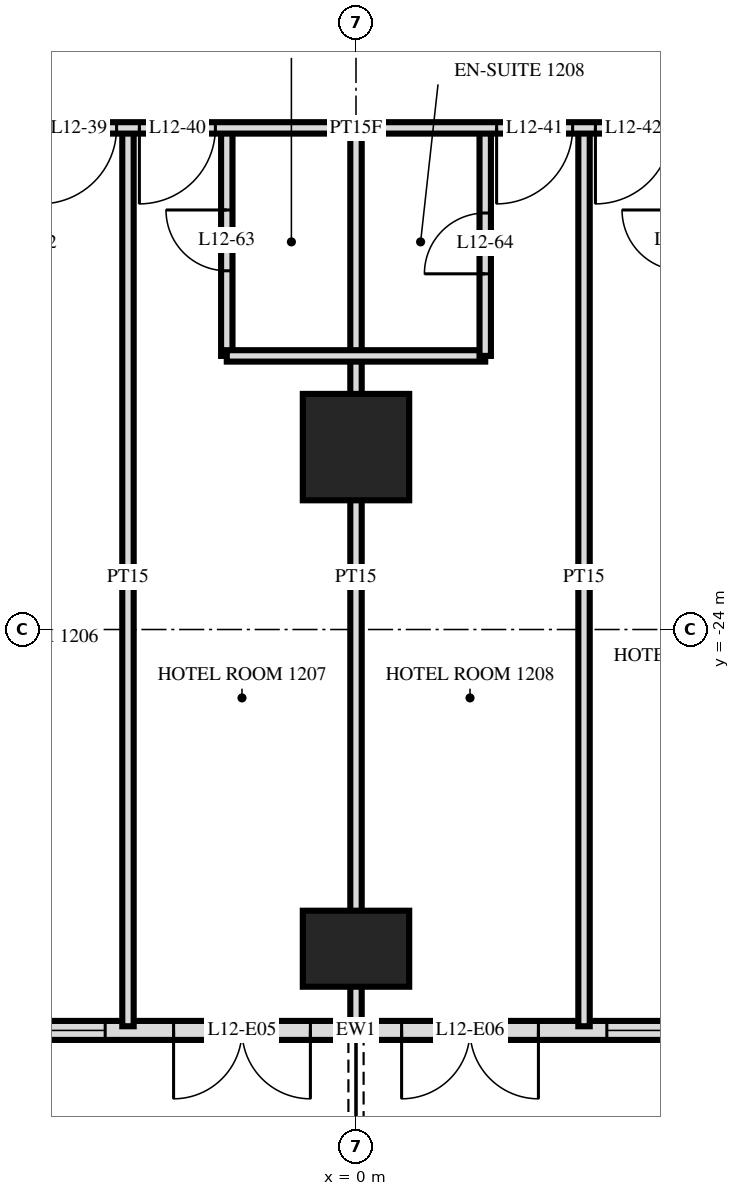
"""IFC4 building model, lengths in metres.
Left out: names, types, materials, properties, quantities, classifications, styles, units other than length and angle.
Written with IfcOpenShell. Run it as: python <this file> out.ifc"""

import sys

from ifc_helpers import new_model, si_unit, direction, frame, frame_2d, origin, origin_2d, place, context, subcontext, project, spatial, rectangle, extrude, element, fill, save


model = new_model("IFC4")
c1 = context("Model", 3, precision=1e-05, world=origin(), true_north=direction((0.0, 1.0)))
c2 = subcontext(c1, "Body", "Model", "MODEL_VIEW")
j1 = project(units=[si_unit("LENGTHUNIT", "METRE"), si_unit("PLANEANGLEUNIT", "RADIAN")], contexts=[c1])
p1 = place(None, origin())
s1 = spatial("IfcSite", under=j1, at=p1, CompositionType="ELEMENT")
p2 = place(p1, origin())
s2 = spatial("IfcBuilding", under=s1, at=p2, CompositionType="ELEMENT")
p3 = place(p2, frame((0.0, 0.0, 52.8)))
s3 = spatial("IfcBuildingStorey", under=s2, at=p3, CompositionType="ELEMENT", Elevation=52.8)
p4 = place(p3, frame((0.0, -28.2, 0.0), z_axis=(0.0, 0.0, 1.0), x_axis=(1.0, 0.0, 0.0)))
e1 = element("IfcColumn", 1, at=p4, inside=s3, PredefinedType="COLUMN", context=c2, shape_type="SweptSolid", body=[
    extrude(rectangle(XDim=1.4, YDim=1.0, at=origin_2d()), origin(), (0.0, 0.0, 1.0), 3.6),
])
p5 = place(p3, frame((0.0, -21.6, 0.0), z_axis=(0.0, 0.0, 1.0), x_axis=(1.0, 0.0, 0.0)))
e2 = element("IfcColumn", 2, at=p5, inside=s3, PredefinedType="COLUMN", context=c2, shape_type="SweptSolid", body=[
    extrude(rectangle(XDim=1.4, YDim=1.4, at=origin_2d()), origin(), (0.0, 0.0, 1.0), 3.6),
])
p6 = place(p3, frame((-28.775, -29.275, 0.0), z_axis=(0.0, 0.0, 1.0), x_axis=(1.0, 0.0, 0.0)))
e3 = element("IfcWall", 3, at=p6, inside=s3, PredefinedType="SOLIDWALL", context=c2, shape_type="SweptSolid", body=[
    extrude(rectangle(XDim=57.551, YDim=0.25, at=frame_2d((28.775, 0.0))), origin(), (0.0, 0.0, 1.0), 3.32),
])
p7 = place(p6, frame((0.575, 0.0, 0.0)))
e4 = element("IfcOpeningElement", 4, at=p7, cuts=e3, PredefinedType="OPENING", context=c2, shape_type="SweptSolid", body=[
    extrude(rectangle(XDim=1.8, YDim=2.4, at=frame_2d((0.9, 1.2))), frame((0.0, 0.135, 0.0), z_axis=(0.0, -1.0, 0.0), x_axis=(1.0, 0.0, 0.0)), (0.0, 0.0, 1.0), 0.27),
])
p8 = place(p6, frame((5.375, 0.0, 0.0)))
e5 = element("IfcOpeningElement", 5, at=p8, cuts=e3, PredefinedType="OPENING", context=c2, shape_type="SweptSolid", body=[
    extrude(rectangle(XDim=1.8, YDim=2.4, at=frame_2d((0.9, 1.2))), frame((0.0, 0.135, 0.0), z_axis=(0.0, -1.0, 0.0), x_axis=(1.0, 0.0, 0.0)), (0.0, 0.0, 1.0), 0.27),
])
p9 = place(p6, frame((8.075, 0.0, 0.3)))
e6 = element("IfcOpeningElement", 6, at=p9, cuts=e3, PredefinedType="OPENING", context=c2, shape_type="SweptSolid", body=[
    extrude(rectangle(XDim=2.4, YDim=2.1, at=frame_2d((1.2, 1.05))), frame((0.0, 0.135, 0.0), z_axis=(0.0, -1.0, 0.0), x_axis=(1.0, 0.0, 0.0)), (0.0, 0.0, 1.0), 0.27),
])
p10 = place(p6, frame((11.375, 0.0, 0.0)))
e7 = element("IfcOpeningElement", 7, at=p10, cuts=e3, PredefinedType="OPENING", context=c2, shape_type="SweptSolid", body=[
    extrude(rectangle(XDim=1.8, YDim=2.4, at=frame_2d((0.9, 1.2))), frame((0.0, 0.135, 0.0), z_axis=(0.0, -1.0, 0.0), x_axis=(1.0, 0.0, 0.0)), (0.0, 0.0, 1.0), 0.27),
])
p11 = place(p6, frame((14.075, 0.0, 0.3)))
e8 = element("IfcOpeningElement", 8, at=p11, cuts=e3, PredefinedType="OPENING", context=c2, shape_type="SweptSolid", body=[
    extrude(rectangle(XDim=2.4, YDim=2.1, at=frame_2d((1.2, 1.05))), frame((0.0, 0.135, 0.0), z_axis=(0.0, -1.0, 0.0), x_axis=(1.0, 0.0, 0.0)), (0.0, 0.0, 1.0), 0.27),
])
p12 = place(p6, frame((17.375, 0.0, 0.0)))
e9 = element("IfcOpeningElement", 9, at=p12, cuts=e3, PredefinedType="OPENING", context=c2, shape_type="SweptSolid", body=[
    extrude(rectangle(XDim=1.8, YDim=2.4, at=frame_2d((0.9, 1.2))), frame((0.0, 0.135, 0.0), z_axis=(0.0, -1.0, 0.0), x_axis=(1.0, 0.0, 0.0)), (0.0, 0.0, 1.0), 0.27),
])
p13 = place(p6, frame((20.075, 0.0, 0.3)))
e10 = element("IfcOpeningElement", 10, at=p13, cuts=e3, PredefinedType="OPENING", context=c2, shape_type="SweptSolid", body=[
    extrude(rectangle(XDim=2.4, YDim=2.1, at=frame_2d((1.2, 1.05))), frame((0.0, 0.135, 0.0), z_axis=(0.0, -1.0, 0.0), x_axis=(1.0, 0.0, 0.0)), (0.0, 0.0, 1.0), 0.27),
])
p14 = place(p6, frame((23.075, 0.0, 0.3)))
e11 = element("IfcOpeningElement", 11, at=p14, cuts=e3, PredefinedType="OPENING", context=c2, shape_type="SweptSolid", body=[
    extrude(rectangle(XDim=2.4, YDim=2.1, at=frame_2d((1.2, 1.05))), frame((0.0, 0.135, 0.0), z_axis=(0.0, -1.0, 0.0), x_axis=(1.0, 0.0, 0.0)), (0.0, 0.0, 1.0), 0.27),
])
p15 = place(p6, frame((26.375, 0.0, 0.0)))
e12 = element("IfcOpeningElement", 12, at=p15, cuts=e3, PredefinedType="OPENING", context=c2, shape_type="SweptSolid", body=[
    extrude(rectangle(XDim=1.8, YDim=2.4, at=frame_2d((0.9, 1.2))), frame((0.0, 0.135, 0.0), z_axis=(0.0, -1.0, 0.0), x_axis=(1.0, 0.0, 0.0)), (0.0, 0.0, 1.0), 0.27),
])
p16 = place(p6, frame((29.375, 0.0, 0.0)))
e13 = element("IfcOpeningElement", 13, at=p16, cuts=e3, PredefinedType="OPENING", context=c2, shape_type="SweptSolid", body=[
    extrude(rectangle(XDim=1.8, YDim=2.4, at=frame_2d((0.9, 1.2))), frame((0.0, 0.135, 0.0), z_axis=(0.0, -1.0, 0.0), x_axis=(1.0, 0.0, 0.0)), (0.0, 0.0, 1.0), 0.27),
])
p17 = place(p6, frame((32.075, 0.0, 0.3)))
e14 = element("IfcOpeningElement", 14, at=p17, cuts=e3, PredefinedType="OPENING", context=c2, shape_type="SweptSolid", body=[
    extrude(rectangle(XDim=2.4, YDim=2.1, at=frame_2d((1.2, 1.05))), frame((0.0, 0.135, 0.0), z_axis=(0.0, -1.0, 0.0), x_axis=(1.0, 0.0, 0.0)), (0.0, 0.0, 1.0), 0.27),
])
p18 = place(p6, frame((35.075, 0.0, 0.3)))
e15 = element("IfcOpeningElement", 15, at=p18, cuts=e3, PredefinedType="OPENING", context=c2, shape_type="SweptSolid", body=[
    extrude(rectangle(XDim=2.4, YDim=2.1, at=frame_2d((1.2, 1.05))), frame((0.0, 0.135, 0.0), z_axis=(0.0, -1.0, 0.0), x_axis=(1.0, 0.0, 0.0)), (0.0, 0.0, 1.0), 0.27),
])
p19 = place(p6, frame((38.375, 0.0, 0.0)))
e16 = element("IfcOpeningElement", 16, at=p19, cuts=e3, PredefinedType="OPENING", context=c2, shape_type="SweptSolid", body=[
    extrude(rectangle(XDim=1.8, YDim=2.4, at=frame_2d((0.9, 1.2))), frame((0.0, 0.135, 0.0), z_axis=(0.0, -1.0, 0.0), x_axis=(1.0, 0.0, 0.0)), (0.0, 0.0, 1.0), 0.27),
])
p20 = place(p6, frame((41.375, 0.0, 0.0)))
e17 = element("IfcOpeningElement", 17, at=p20, cuts=e3, PredefinedType="OPENING", context=c2, shape_type="SweptSolid", body=[
    extrude(rectangle(XDim=1.8, YDim=2.4, at=frame_2d((0.9, 1.2))), frame((0.0, 0.135, 0.0), z_axis=(0.0, -1.0, 0.0), x_axis=(1.0, 0.0, 0.0)), (0.0, 0.0, 1.0), 0.27),
])
p21 = place(p6, frame((44.075, 0.0, 0.3)))
e18 = element("IfcOpeningElement", 18, at=p21, cuts=e3, PredefinedType="OPENING", context=c2, shape_type="SweptSolid", body=[
    extrude(rectangle(XDim=2.4, YDim=2.1, at=frame_2d((1.2, 1.05))), frame((0.0, 0.135, 0.0), z_axis=(0.0, -1.0, 0.0), x_axis=(1.0, 0.0, 0.0)), (0.0, 0.0, 1.0), 0.27),
])
p22 = place(p6, frame((47.075, 0.0, 0.3)))
e19 = element("IfcOpeningElement", 19, at=p22, cuts=e3, PredefinedType="OPENING", context=c2, shape_type="SweptSolid", body=[
    extrude(rectangle(XDim=2.4, YDim=2.1, at=frame_2d((1.2, 1.05))), frame((0.0, 0.135, 0.0), z_axis=(0.0, -1.0, 0.0), x_axis=(1.0, 0.0, 0.0)), (0.0, 0.0, 1.0), 0.27),
])
p23 = place(p6, frame((50.375, 0.0, 0.0)))
e20 = element("IfcOpeningElement", 20, at=p23, cuts=e3, PredefinedType="OPENING", context=c2, shape_type="SweptSolid", body=[
    extrude(rectangle(XDim=1.8, YDim=2.4, at=frame_2d((0.9, 1.2))), frame((0.0, 0.135, 0.0), z_axis=(0.0, -1.0, 0.0), x_axis=(1.0, 0.0, 0.0)), (0.0, 0.0, 1.0), 0.27),
])
p24 = place(p6, frame((53.375, 0.0, 0.0)))
e21 = element("IfcOpeningElement", 21, at=p24, cuts=e3, PredefinedType="OPENING", context=c2, shape_type="SweptSolid", body=[
    extrude(rectangle(XDim=1.8, YDim=2.4, at=frame_2d((0.9, 1.2))), frame((0.0, 0.135, 0.0), z_axis=(0.0, -1.0, 0.0), x_axis=(1.0, 0.0, 0.0)), (0.0, 0.0, 1.0), 0.27),
])
p25 = place(p3, frame((3.0, -29.22, 0.0), z_axis=(0.0, 0.0, 1.0), x_axis=(0.0, 1.0, 0.0)))
e22 = element("IfcWall", 22, at=p25, inside=s3, PredefinedType="PARTITIONING", context=c2, shape_type="SweptSolid", body=[
    extrude(rectangle(XDim=11.82, YDim=0.15, at=frame_2d((5.91, 0.0))), origin(), (0.0, 0.0, 1.0), 3.32),
])
p26 = place(p3, frame((1.7, -20.4, 0.0), z_axis=(0.0, 0.0, 1.0), x_axis=(0.0, 1.0, 0.0)))
e23 = element("IfcWall", 23, at=p26, inside=s3, PredefinedType="PARTITIONING", context=c2, shape_type="SweptSolid", body=[
    extrude(rectangle(XDim=3.0, YDim=0.15, at=frame_2d((1.5, 0.0))), origin(), (0.0, 0.0, 1.0), 3.32),
])
p27 = place(p26, frame((1.08, 0.0, 0.0)))
e24 = element("IfcOpeningElement", 24, at=p27, cuts=e23, PredefinedType="OPENING", context=c2, shape_type="SweptSolid", body=[
    extrude(rectangle(XDim=0.8, YDim=2.1, at=frame_2d((0.4, 1.05))), frame((0.0, 0.085, 0.0), z_axis=(0.0, -1.0, 0.0), x_axis=(1.0, 0.0, 0.0)), (0.0, 0.0, 1.0), 0.17),
])
p28 = place(p3, frame((0.0, -29.22, 0.0), z_axis=(0.0, 0.0, 1.0), x_axis=(0.0, 1.0, 0.0)))
e25 = element("IfcWall", 25, at=p28, inside=s3, PredefinedType="PARTITIONING", context=c2, shape_type="SweptSolid", body=[
    extrude(rectangle(XDim=11.82, YDim=0.15, at=frame_2d((5.91, 0.0))), origin(), (0.0, 0.0, 1.0), 3.32),
])
p29 = place(p3, frame((-1.7, -20.4, 0.0), z_axis=(0.0, 0.0, 1.0), x_axis=(0.0, 1.0, 0.0)))
e26 = element("IfcWall", 26, at=p29, inside=s3, PredefinedType="PARTITIONING", context=c2, shape_type="SweptSolid", body=[
    extrude(rectangle(XDim=3.0, YDim=0.15, at=frame_2d((1.5, 0.0))), origin(), (0.0, 0.0, 1.0), 3.32),
])
p30 = place(p29, frame((1.12, 0.0, 0.0)))
e27 = element("IfcOpeningElement", 27, at=p30, cuts=e26, PredefinedType="OPENING", context=c2, shape_type="SweptSolid", body=[
    extrude(rectangle(XDim=0.8, YDim=2.1, at=frame_2d((0.4, 1.05))), frame((0.0, 0.085, 0.0), z_axis=(0.0, -1.0, 0.0), x_axis=(1.0, 0.0, 0.0)), (0.0, 0.0, 1.0), 0.17),
])
p31 = place(p3, frame((-3.0, -29.22, 0.0), z_axis=(0.0, 0.0, 1.0), x_axis=(0.0, 1.0, 0.0)))
e28 = element("IfcWall", 28, at=p31, inside=s3, PredefinedType="PARTITIONING", context=c2, shape_type="SweptSolid", body=[
    extrude(rectangle(XDim=11.82, YDim=0.15, at=frame_2d((5.91, 0.0))), origin(), (0.0, 0.0, 1.0), 3.32),
])
p32 = place(p3, frame((-1.7, -20.4, 0.0), z_axis=(0.0, 0.0, 1.0), x_axis=(1.0, 0.0, 0.0)))
e29 = element("IfcWall", 29, at=p32, inside=s3, PredefinedType="PARTITIONING", context=c2, shape_type="SweptSolid", body=[
    extrude(rectangle(XDim=3.4, YDim=0.15, at=frame_2d((1.7, 0.0))), origin(), (0.0, 0.0, 1.0), 3.32),
])
p33 = place(p3, frame((-33.12, -17.4, 0.0), z_axis=(0.0, 0.0, 1.0), x_axis=(1.0, 0.0, 0.0)))
e30 = element("IfcWall", 30, at=p33, inside=s3, PredefinedType="PARTITIONING", context=c2, shape_type="SweptSolid", body=[
    extrude(rectangle(XDim=66.24, YDim=0.15, at=frame_2d((33.12, 0.0))), origin(), (0.0, 0.0, 1.0), 3.32),
])
p34 = place(p33, frame((9.27, 0.0, 0.0)))
e31 = element("IfcOpeningElement", 31, at=p34, cuts=e30, PredefinedType="OPENING", context=c2, shape_type="SweptSolid", body=[
    extrude(rectangle(XDim=1.0, YDim=2.1, at=frame_2d((0.5, 1.05))), frame((0.0, 0.085, 0.0), z_axis=(0.0, -1.0, 0.0), x_axis=(1.0, 0.0, 0.0)), (0.0, 0.0, 1.0), 0.17),
])
p35 = place(p33, frame((13.97, 0.0, 0.0)))
e32 = element("IfcOpeningElement", 32, at=p35, cuts=e30, PredefinedType="OPENING", context=c2, shape_type="SweptSolid", body=[
    extrude(rectangle(XDim=1.0, YDim=2.1, at=frame_2d((0.5, 1.05))), frame((0.0, 0.085, 0.0), z_axis=(0.0, -1.0, 0.0), x_axis=(1.0, 0.0, 0.0)), (0.0, 0.0, 1.0), 0.17),
])
p36 = place(p33, frame((15.27, 0.0, 0.0)))
e33 = element("IfcOpeningElement", 33, at=p36, cuts=e30, PredefinedType="OPENING", context=c2, shape_type="SweptSolid", body=[
    extrude(rectangle(XDim=1.0, YDim=2.1, at=frame_2d((0.5, 1.05))), frame((0.0, 0.085, 0.0), z_axis=(0.0, -1.0, 0.0), x_axis=(1.0, 0.0, 0.0)), (0.0, 0.0, 1.0), 0.17),
])
p37 = place(p33, frame((19.97, 0.0, 0.0)))
e34 = element("IfcOpeningElement", 34, at=p37, cuts=e30, PredefinedType="OPENING", context=c2, shape_type="SweptSolid", body=[
    extrude(rectangle(XDim=1.0, YDim=2.1, at=frame_2d((0.5, 1.05))), frame((0.0, 0.085, 0.0), z_axis=(0.0, -1.0, 0.0), x_axis=(1.0, 0.0, 0.0)), (0.0, 0.0, 1.0), 0.17),
])
p38 = place(p33, frame((22.27, 0.0, 0.0)))
e35 = element("IfcOpeningElement", 35, at=p38, cuts=e30, PredefinedType="OPENING", context=c2, shape_type="SweptSolid", body=[
    extrude(rectangle(XDim=1.0, YDim=2.1, at=frame_2d((0.5, 1.05))), frame((0.0, 0.085, 0.0), z_axis=(0.0, -1.0, 0.0), x_axis=(1.0, 0.0, 0.0)), (0.0, 0.0, 1.0), 0.17),
])
p39 = place(p33, frame((28.97, 0.0, 0.0)))
e36 = element("IfcOpeningElement", 36, at=p39, cuts=e30, PredefinedType="OPENING", context=c2, shape_type="SweptSolid", body=[
    extrude(rectangle(XDim=1.0, YDim=2.1, at=frame_2d((0.5, 1.05))), frame((0.0, 0.085, 0.0), z_axis=(0.0, -1.0, 0.0), x_axis=(1.0, 0.0, 0.0)), (0.0, 0.0, 1.0), 0.17),
])
p40 = place(p33, frame((30.27, 0.0, 0.0)))
e37 = element("IfcOpeningElement", 37, at=p40, cuts=e30, PredefinedType="OPENING", context=c2, shape_type="SweptSolid", body=[
    extrude(rectangle(XDim=1.0, YDim=2.1, at=frame_2d((0.5, 1.05))), frame((0.0, 0.085, 0.0), z_axis=(0.0, -1.0, 0.0), x_axis=(1.0, 0.0, 0.0)), (0.0, 0.0, 1.0), 0.17),
])
p41 = place(p33, frame((34.97, 0.0, 0.0)))
e38 = element("IfcOpeningElement", 38, at=p41, cuts=e30, PredefinedType="OPENING", context=c2, shape_type="SweptSolid", body=[
    extrude(rectangle(XDim=1.0, YDim=2.1, at=frame_2d((0.5, 1.05))), frame((0.0, 0.085, 0.0), z_axis=(0.0, -1.0, 0.0), x_axis=(1.0, 0.0, 0.0)), (0.0, 0.0, 1.0), 0.17),
])
p42 = place(p33, frame((36.27, 0.0, 0.0)))
e39 = element("IfcOpeningElement", 39, at=p42, cuts=e30, PredefinedType="OPENING", context=c2, shape_type="SweptSolid", body=[
    extrude(rectangle(XDim=1.0, YDim=2.1, at=frame_2d((0.5, 1.05))), frame((0.0, 0.085, 0.0), z_axis=(0.0, -1.0, 0.0), x_axis=(1.0, 0.0, 0.0)), (0.0, 0.0, 1.0), 0.17),
])
p43 = place(p33, frame((39.82, 0.0, 0.0)))
e40 = element("IfcOpeningElement", 40, at=p43, cuts=e30, PredefinedType="OPENING", context=c2, shape_type="SweptSolid", body=[
    extrude(rectangle(XDim=1.0, YDim=2.1, at=frame_2d((0.5, 1.05))), frame((0.0, 0.085, 0.0), z_axis=(0.0, -1.0, 0.0), x_axis=(1.0, 0.0, 0.0)), (0.0, 0.0, 1.0), 0.17),
])
p44 = place(p33, frame((51.27, 0.0, 0.0)))
e41 = element("IfcOpeningElement", 41, at=p44, cuts=e30, PredefinedType="OPENING", context=c2, shape_type="SweptSolid", body=[
    extrude(rectangle(XDim=1.0, YDim=2.1, at=frame_2d((0.5, 1.05))), frame((0.0, 0.085, 0.0), z_axis=(0.0, -1.0, 0.0), x_axis=(1.0, 0.0, 0.0)), (0.0, 0.0, 1.0), 0.17),
])
p45 = place(p33, frame((4.42, 0.0, 0.0)))
e42 = element("IfcOpeningElement", 42, at=p45, cuts=e30, PredefinedType="OPENING", context=c2, shape_type="SweptSolid", body=[
    extrude(rectangle(XDim=1.0, YDim=2.1, at=frame_2d((0.5, 1.05))), frame((0.0, 0.085, 0.0), z_axis=(0.0, -1.0, 0.0), x_axis=(1.0, 0.0, 0.0)), (0.0, 0.0, 1.0), 0.17),
])
p46 = place(p33, frame((54.82, 0.0, 0.0)))
e43 = element("IfcOpeningElement", 43, at=p46, cuts=e30, PredefinedType="OPENING", context=c2, shape_type="SweptSolid", body=[
    extrude(rectangle(XDim=1.0, YDim=2.1, at=frame_2d((0.5, 1.05))), frame((0.0, 0.085, 0.0), z_axis=(0.0, -1.0, 0.0), x_axis=(1.0, 0.0, 0.0)), (0.0, 0.0, 1.0), 0.17),
])
p47 = place(p14, origin())
e44 = element("IfcWindow", 44, at=p47, inside=s3, PartitioningType="SINGLE_PANEL", PredefinedType="WINDOW", context=c2, shape_type="SweptSolid", body=[
    extrude(rectangle(XDim=2.4, YDim=2.1, at=frame_2d((1.2, 1.05))), frame((0.0, 0.03, 0.0), z_axis=(0.0, -1.0, 0.0), x_axis=(1.0, 0.0, 0.0)), (0.0, 0.0, 1.0), 0.06),
])
fill(e11, e44)
p48 = place(p15, frame((0.9, 0.0, 0.0), z_axis=(0.0, 0.0, 1.0), x_axis=(-1.0, 0.0, 0.0)))
e45 = element("IfcDoor", 45, at=p48, inside=s3, OperationType="DOUBLE_DOOR_SINGLE_SWING", PredefinedType="DOOR", context=c2, shape_type="SweptSolid", body=[
    extrude(rectangle(XDim=1.8, YDim=2.4, at=frame_2d((0.0, 1.2))), frame((0.0, -0.025, 0.0), z_axis=(0.0, 1.0, 0.0), x_axis=(-1.0, 0.0, 0.0)), (0.0, 0.0, 1.0), 0.05),
])
fill(e12, e45)
p49 = place(p16, frame((0.9, 0.0, 0.0), z_axis=(0.0, 0.0, 1.0), x_axis=(-1.0, 0.0, 0.0)))
e46 = element("IfcDoor", 46, at=p49, inside=s3, OperationType="DOUBLE_DOOR_SINGLE_SWING", PredefinedType="DOOR", context=c2, shape_type="SweptSolid", body=[
    extrude(rectangle(XDim=1.8, YDim=2.4, at=frame_2d((0.0, 1.2))), frame((0.0, -0.025, 0.0), z_axis=(0.0, 1.0, 0.0), x_axis=(-1.0, 0.0, 0.0)), (0.0, 0.0, 1.0), 0.05),
])
fill(e13, e46)
p50 = place(p17, origin())
e47 = element("IfcWindow", 47, at=p50, inside=s3, PartitioningType="SINGLE_PANEL", PredefinedType="WINDOW", context=c2, shape_type="SweptSolid", body=[
    extrude(rectangle(XDim=2.4, YDim=2.1, at=frame_2d((1.2, 1.05))), frame((0.0, 0.03, 0.0), z_axis=(0.0, -1.0, 0.0), x_axis=(1.0, 0.0, 0.0)), (0.0, 0.0, 1.0), 0.06),
])
fill(e14, e47)
p51 = place(p39, frame((0.5, 0.0, 0.0), z_axis=(0.0, 0.0, 1.0), x_axis=(-1.0, 0.0, 0.0)))
e48 = element("IfcDoor", 48, at=p51, inside=s3, OperationType="SINGLE_SWING_LEFT", PredefinedType="DOOR", context=c2, shape_type="SweptSolid", body=[
    extrude(rectangle(XDim=1.0, YDim=2.1, at=frame_2d((0.0, 1.05))), frame((0.0, -0.025, 0.0), z_axis=(0.0, 1.0, 0.0), x_axis=(-1.0, 0.0, 0.0)), (0.0, 0.0, 1.0), 0.05),
])
fill(e36, e48)
p52 = place(p40, frame((0.5, 0.0, 0.0), z_axis=(0.0, 0.0, 1.0), x_axis=(-1.0, 0.0, 0.0)))
e49 = element("IfcDoor", 49, at=p52, inside=s3, OperationType="SINGLE_SWING_LEFT", PredefinedType="DOOR", context=c2, shape_type="SweptSolid", body=[
    extrude(rectangle(XDim=1.0, YDim=2.1, at=frame_2d((0.0, 1.05))), frame((0.0, -0.025, 0.0), z_axis=(0.0, 1.0, 0.0), x_axis=(-1.0, 0.0, 0.0)), (0.0, 0.0, 1.0), 0.05),
])
fill(e37, e49)
p53 = place(p41, frame((0.5, 0.0, 0.0), z_axis=(0.0, 0.0, 1.0), x_axis=(-1.0, 0.0, 0.0)))
e50 = element("IfcDoor", 50, at=p53, inside=s3, OperationType="SINGLE_SWING_LEFT", PredefinedType="DOOR", context=c2, shape_type="SweptSolid", body=[
    extrude(rectangle(XDim=1.0, YDim=2.1, at=frame_2d((0.0, 1.05))), frame((0.0, -0.025, 0.0), z_axis=(0.0, 1.0, 0.0), x_axis=(-1.0, 0.0, 0.0)), (0.0, 0.0, 1.0), 0.05),
])
fill(e38, e50)
p54 = place(p42, frame((0.5, 0.0, 0.0), z_axis=(0.0, 0.0, 1.0), x_axis=(-1.0, 0.0, 0.0)))
e51 = element("IfcDoor", 51, at=p54, inside=s3, OperationType="SINGLE_SWING_LEFT", PredefinedType="DOOR", context=c2, shape_type="SweptSolid", body=[
    extrude(rectangle(XDim=1.0, YDim=2.1, at=frame_2d((0.0, 1.05))), frame((0.0, -0.025, 0.0), z_axis=(0.0, 1.0, 0.0), x_axis=(-1.0, 0.0, 0.0)), (0.0, 0.0, 1.0), 0.05),
])
fill(e39, e51)
p55 = place(p30, origin())
e52 = element("IfcDoor", 52, at=p55, inside=s3, OperationType="SINGLE_SWING_LEFT", PredefinedType="DOOR", context=c2, shape_type="SweptSolid", body=[
    extrude(rectangle(XDim=0.8, YDim=2.1, at=frame_2d((0.4, 1.05))), frame((0.0, 0.025, 0.0), z_axis=(0.0, -1.0, 0.0), x_axis=(1.0, 0.0, 0.0)), (0.0, 0.0, 1.0), 0.05),
])
fill(e27, e52)
p56 = place(p27, origin())
e53 = element("IfcDoor", 53, at=p56, inside=s3, OperationType="SINGLE_SWING_RIGHT", PredefinedType="DOOR", context=c2, shape_type="SweptSolid", body=[
    extrude(rectangle(XDim=0.8, YDim=2.1, at=frame_2d((0.4, 1.05))), frame((0.0, 0.025, 0.0), z_axis=(0.0, -1.0, 0.0), x_axis=(1.0, 0.0, 0.0)), (0.0, 0.0, 1.0), 0.05),
])
fill(e24, e53)
save(model, sys.argv[1])
